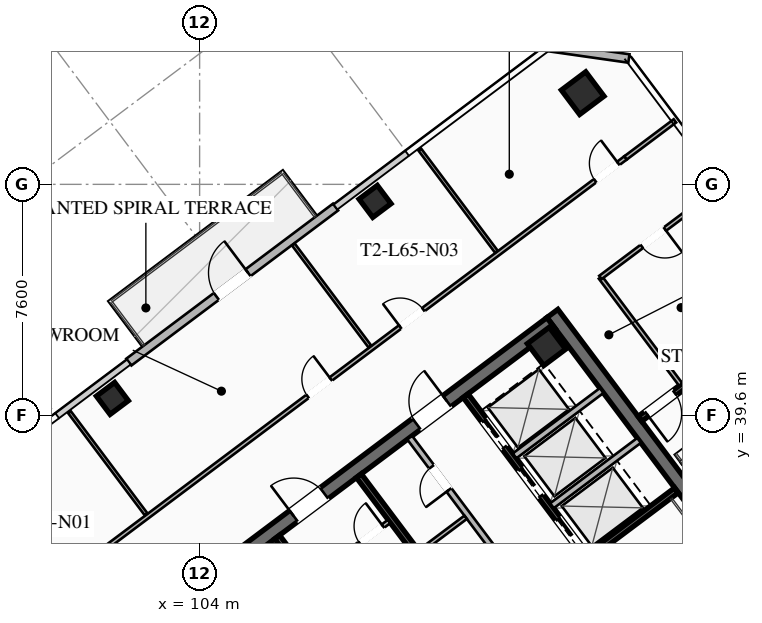
"""IFC4 building model, lengths in metres.
Left out: names, types, materials, properties, quantities, classifications, styles, units other than length and angle.
Written with IfcOpenShell. Run it as: python <this file> out.ifc"""

import sys

from ifc_helpers import new_model, si_unit, direction, frame, frame_2d, origin, origin_2d, place, context, subcontext, project, spatial, rectangle, hollow_rectangle, extrude, element, fill, save


model = new_model("IFC4")
c1 = context("Model", 3, precision=1e-05, world=origin(), true_north=direction((0.0, 1.0)))
c2 = subcontext(c1, "Body", "Model", "MODEL_VIEW")
j1 = project(units=[si_unit("LENGTHUNIT", "METRE"), si_unit("PLANEANGLEUNIT", "RADIAN")], contexts=[c1])
p1 = place(None, origin())
s1 = spatial("IfcSite", under=j1, at=p1, CompositionType="ELEMENT")
p2 = place(p1, origin())
s2 = spatial("IfcBuilding", under=s1, at=p2, CompositionType="ELEMENT")
p3 = place(p2, frame((0.0, 0.0, 239.7)))
s3 = spatial("IfcBuildingStorey", under=s2, at=p3, CompositionType="ELEMENT", Elevation=239.7)
p4 = place(p3, frame((115.604, 42.953, 0.0), z_axis=(0.0, 0.0, 1.0), x_axis=(0.600005007985, -0.799996243986, 0.0)))
e1 = element("IfcWall", 1, at=p4, inside=s3, PredefinedType="SHEAR", context=c2, shape_type="SweptSolid", body=[
    extrude(rectangle(XDim=15.6, YDim=0.45, at=frame_2d((7.8, 0.0))), origin(), (0.0, 0.0, 1.0), 3.55),
])
p5 = place(p3, frame((103.351, 33.482, 0.0), z_axis=(0.0, 0.0, 1.0), x_axis=(0.8, 0.6, 0.0)))
e2 = element("IfcWall", 2, at=p5, inside=s3, PredefinedType="SHEAR", context=c2, shape_type="SweptSolid", body=[
    extrude(rectangle(XDim=15.26, YDim=0.45, at=frame_2d((7.63, 0.0))), origin(), (0.0, 0.0, 1.0), 3.55),
])
p6 = place(p5, frame((4.68, 0.0, 0.0)))
e3 = element("IfcOpeningElement", 3, at=p6, cuts=e2, PredefinedType="OPENING", context=c2, shape_type="SweptSolid", body=[
    extrude(rectangle(XDim=1.25, YDim=2.25, at=frame_2d((0.625, 1.125))), frame((0.0, 0.235, 0.0), z_axis=(0.0, -1.0, 0.0), x_axis=(1.0, 0.0, 0.0)), (0.0, 0.0, 1.0), 0.47),
])
p7 = place(p5, frame((9.73, 0.0, 0.0)))
e4 = element("IfcOpeningElement", 4, at=p7, cuts=e2, PredefinedType="OPENING", context=c2, shape_type="SweptSolid", body=[
    extrude(rectangle(XDim=1.25, YDim=2.25, at=frame_2d((0.625, 1.125))), frame((0.0, 0.235, 0.0), z_axis=(0.0, -1.0, 0.0), x_axis=(1.0, 0.0, 0.0)), (0.0, 0.0, 1.0), 0.47),
])
p8 = place(p3, frame((115.41, 41.87, 0.0), z_axis=(0.0, 0.0, 1.0), x_axis=(0.799999996291, 0.600000004945, 0.0)))
e5 = element("IfcColumn", 5, at=p8, inside=s3, PredefinedType="COLUMN", context=c2, shape_type="SweptSolid", body=[
    extrude(hollow_rectangle(XDim=0.9, YDim=0.9, WallThickness=0.04, at=origin_2d()), origin(), (0.0, 0.0, 1.0), 3.37),
])
p9 = place(p3, frame((116.6, 50.2, 0.0), z_axis=(0.0, 0.0, 1.0), x_axis=(0.799999996291, 0.600000004945, 0.0)))
e6 = element("IfcColumn", 6, at=p9, inside=s3, PredefinedType="COLUMN", context=c2, shape_type="SweptSolid", body=[
    extrude(hollow_rectangle(XDim=1.0, YDim=1.0, WallThickness=0.04, at=origin_2d()), origin(), (0.0, 0.0, 1.0), 3.37),
])
for number, where, z_axis, x_axis in (
    (7, (109.77, 46.64, 0.0), (0.0, 0.0, 1.0), (0.8, 0.6, 0.0)),
    (8, (101.13, 40.16, 0.0), (0.0, 0.0, 1.0), (0.8, 0.6, 0.0)),
):
    element("IfcColumn", number, at=place(p3, frame(where, z_axis=z_axis, x_axis=x_axis)), inside=s3, PredefinedType="COLUMN", context=c2, shape_type="SweptSolid", body=[
        extrude(hollow_rectangle(XDim=0.75, YDim=0.75, WallThickness=0.032, at=origin_2d()), origin(), (0.0, 0.0, 1.0), 3.37),
    ])
p10 = place(p3, frame((101.672, 41.354, 0.0), z_axis=(0.0, 0.0, 1.0), x_axis=(0.799986212866, 0.600018382406, 0.0)))
e9 = element("IfcWall", 9, at=p10, inside=s3, PredefinedType="SOLIDWALL", context=c2, shape_type="SweptSolid", body=[
    extrude(rectangle(XDim=8.5, YDim=0.28, at=frame_2d((4.25, 0.0))), origin(), (0.0, 0.0, 1.0), 3.37),
])
p11 = place(p10, frame((3.6, 0.0, 0.0)))
e10 = element("IfcOpeningElement", 10, at=p11, cuts=e9, PredefinedType="OPENING", context=c2, shape_type="SweptSolid", body=[
    extrude(rectangle(XDim=1.3, YDim=2.15, at=frame_2d((0.65, 1.075))), frame((0.0, 0.15, 0.0), z_axis=(0.0, -1.0, 0.0), x_axis=(1.0, 0.0, 0.0)), (0.0, 0.0, 1.0), 0.3),
])
p12 = place(p3, frame((115.46, 51.72, 0.0), z_axis=(0.0, 0.0, 1.0), x_axis=(0.989956760759, -0.141370477216, 0.0)))
e11 = element("IfcWall", 11, at=p12, inside=s3, PredefinedType="SOLIDWALL", context=c2, shape_type="SweptSolid", body=[
    extrude(rectangle(XDim=2.687, YDim=0.28, at=frame_2d((1.344, 0.0))), origin(), (0.0, 0.0, 1.0), 3.37),
])
p13 = place(p3, frame((111.44, 29.08, 0.0), z_axis=(0.0, 0.0, 1.0), x_axis=(-0.59999041401, 0.800007189403, 0.0)))
e12 = element("IfcWall", 12, at=p13, inside=s3, PredefinedType="SHEAR", context=c2, shape_type="SweptSolid", body=[
    extrude(rectangle(XDim=8.15, YDim=0.2, at=frame_2d((4.075, 0.0))), origin(), (0.0, 0.0, 1.0), 3.37),
])
p14 = place(p13, frame((0.45, 0.0, 0.0)))
e13 = element("IfcOpeningElement", 13, at=p14, cuts=e12, PredefinedType="OPENING", context=c2, shape_type="SweptSolid", body=[
    extrude(rectangle(XDim=1.15, YDim=2.2, at=frame_2d((0.575, 1.1))), frame((0.0, 0.11, 0.0), z_axis=(0.0, -1.0, 0.0), x_axis=(1.0, 0.0, 0.0)), (0.0, 0.0, 1.0), 0.22),
])
p15 = place(p3, frame((116.54, 34.78, 0.0), z_axis=(0.0, 0.0, 1.0), x_axis=(0.800014909178, 0.599980120581, 0.0)))
e14 = element("IfcWall", 14, at=p15, inside=s3, PredefinedType="SHEAR", context=c2, shape_type="SweptSolid", body=[
    extrude(rectangle(XDim=3.93, YDim=0.2, at=frame_2d((1.965, 0.0))), origin(), (0.0, 0.0, 1.0), 3.37),
])
p16 = place(p3, frame((118.058, 25.856, 0.0), z_axis=(0.0, 0.0, 1.0), x_axis=(-0.600002657301, 0.799998007018, 0.0)))
e15 = element("IfcWall", 15, at=p16, inside=s3, PredefinedType="SHEAR", context=c2, shape_type="SweptSolid", body=[
    extrude(rectangle(XDim=14.7, YDim=0.2, at=frame_2d((7.35, 0.0))), origin(), (0.0, 0.0, 1.0), 3.37),
])
p17 = place(p3, frame((112.75, 40.25, 0.0), z_axis=(0.0, 0.0, 1.0), x_axis=(0.599994036198, -0.800004472816, 0.0)))
e16 = element("IfcWall", 16, at=p17, inside=s3, PredefinedType="SHEAR", context=c2, shape_type="SweptSolid", body=[
    extrude(rectangle(XDim=6.55, YDim=0.2, at=frame_2d((3.275, 0.0))), origin(), (0.0, 0.0, 1.0), 3.37),
])
p18 = place(p17, frame((5.075, 0.0, 0.0)))
e17 = element("IfcOpeningElement", 17, at=p18, cuts=e16, PredefinedType="OPENING", context=c2, shape_type="SweptSolid", body=[
    extrude(rectangle(XDim=1.1, YDim=2.2, at=frame_2d((0.55, 1.1))), frame((0.0, 0.11, 0.0), z_axis=(0.0, -1.0, 0.0), x_axis=(1.0, 0.0, 0.0)), (0.0, 0.0, 1.0), 0.22),
])
p19 = place(p17, frame((3.025, 0.0, 0.0)))
e18 = element("IfcOpeningElement", 18, at=p19, cuts=e16, PredefinedType="OPENING", context=c2, shape_type="SweptSolid", body=[
    extrude(rectangle(XDim=1.1, YDim=2.2, at=frame_2d((0.55, 1.1))), frame((0.0, 0.11, 0.0), z_axis=(0.0, -1.0, 0.0), x_axis=(1.0, 0.0, 0.0)), (0.0, 0.0, 1.0), 0.22),
])
p20 = place(p17, frame((1.025, 0.0, 0.0)))
e19 = element("IfcOpeningElement", 19, at=p20, cuts=e16, PredefinedType="OPENING", context=c2, shape_type="SweptSolid", body=[
    extrude(rectangle(XDim=1.1, YDim=2.2, at=frame_2d((0.55, 1.1))), frame((0.0, 0.11, 0.0), z_axis=(0.0, -1.0, 0.0), x_axis=(1.0, 0.0, 0.0)), (0.0, 0.0, 1.0), 0.22),
])
for number, where, z_axis, x_axis in (
    (20, (115.59, 36.63, 0.0), (0.0, 0.0, 1.0), (0.8, 0.6, 0.0)),
    (21, (114.36, 38.27, 0.0), (0.0, 0.0, 1.0), (0.8, 0.6, 0.0)),
):
    element("IfcWall", number, at=place(p3, frame(where, z_axis=z_axis, x_axis=x_axis)), inside=s3, PredefinedType="SOLIDWALL", context=c2, shape_type="SweptSolid", body=[
        extrude(rectangle(XDim=3.58, YDim=0.2, at=frame_2d((1.79, 0.0))), origin(), (0.0, 0.0, 1.0), 3.37),
    ])
p21 = place(p3, frame((107.71, 34.22, 0.0), z_axis=(0.0, 0.0, 1.0), x_axis=(0.799981399002, 0.60002480053, 0.0)))
e22 = element("IfcWall", 22, at=p21, inside=s3, PredefinedType="PARTITIONING", context=c2, shape_type="SweptSolid", body=[
    extrude(rectangle(XDim=3.15, YDim=0.135, at=frame_2d((1.575, 0.0))), origin(), (0.0, 0.0, 1.0), 2.723),
])
p22 = place(p21, frame((0.25, 0.0, 0.0)))
e23 = element("IfcOpeningElement", 23, at=p22, cuts=e22, PredefinedType="OPENING", context=c2, shape_type="SweptSolid", body=[
    extrude(rectangle(XDim=0.95, YDim=2.05, at=frame_2d((0.475, 1.025))), frame((0.0, 0.077, 0.0), z_axis=(0.0, -1.0, 0.0), x_axis=(1.0, 0.0, 0.0)), (0.0, 0.0, 1.0), 0.155),
])
p23 = place(p21, frame((1.95, 0.0, 0.0)))
e24 = element("IfcOpeningElement", 24, at=p23, cuts=e22, PredefinedType="OPENING", context=c2, shape_type="SweptSolid", body=[
    extrude(rectangle(XDim=0.95, YDim=2.05, at=frame_2d((0.475, 1.025))), frame((0.0, 0.077, 0.0), z_axis=(0.0, -1.0, 0.0), x_axis=(1.0, 0.0, 0.0)), (0.0, 0.0, 1.0), 0.155),
])
p24 = place(p3, frame((115.11, 33.27, 0.0), z_axis=(0.0, 0.0, 1.0), x_axis=(-0.600011160345, 0.79999162962, 0.0)))
e25 = element("IfcWall", 25, at=p24, inside=s3, PredefinedType="SOLIDWALL", context=c2, shape_type="SweptSolid", body=[
    extrude(rectangle(XDim=7.0, YDim=0.2, at=frame_2d((3.5, 0.0))), origin(), (0.0, 0.0, 1.0), 2.723),
])
p25 = place(p24, frame((0.85, 0.0, 0.0)))
e26 = element("IfcOpeningElement", 26, at=p25, cuts=e25, PredefinedType="OPENING", context=c2, shape_type="SweptSolid", body=[
    extrude(rectangle(XDim=0.95, YDim=2.05, at=frame_2d((0.475, 1.025))), frame((0.0, 0.11, 0.0), z_axis=(0.0, -1.0, 0.0), x_axis=(1.0, 0.0, 0.0)), (0.0, 0.0, 1.0), 0.22),
])
p26 = place(p24, frame((4.85, 0.0, 0.0)))
e27 = element("IfcOpeningElement", 27, at=p26, cuts=e25, PredefinedType="OPENING", context=c2, shape_type="SweptSolid", body=[
    extrude(rectangle(XDim=0.95, YDim=2.05, at=frame_2d((0.475, 1.025))), frame((0.0, 0.11, 0.0), z_axis=(0.0, -1.0, 0.0), x_axis=(1.0, 0.0, 0.0)), (0.0, 0.0, 1.0), 0.22),
])
p27 = place(p3, frame((111.246, 35.122, 0.0), z_axis=(0.0, 0.0, 1.0), x_axis=(0.8, 0.6, 0.0)))
e28 = element("IfcWall", 28, at=p27, inside=s3, PredefinedType="PARTITIONING", context=c2, shape_type="SweptSolid", body=[
    extrude(rectangle(XDim=1.88, YDim=0.135, at=frame_2d((0.94, 0.0))), origin(), (0.0, 0.0, 1.0), 2.723),
])
p28 = place(p3, frame((121.204, 41.528, 0.0), z_axis=(0.0, 0.0, 1.0), x_axis=(-0.800017232136, -0.599977023131, 0.0)))
e29 = element("IfcWall", 29, at=p28, inside=s3, PredefinedType="SHEAR", context=c2, shape_type="SweptSolid", body=[
    extrude(rectangle(XDim=3.4, YDim=0.2, at=frame_2d((1.7, 0.0))), origin(), (0.0, 0.0, 1.0), 3.37),
])
p29 = place(p28, frame((1.975, 0.0, 0.0)))
e30 = element("IfcOpeningElement", 30, at=p29, cuts=e29, PredefinedType="OPENING", context=c2, shape_type="SweptSolid", body=[
    extrude(rectangle(XDim=1.15, YDim=2.2, at=frame_2d((0.575, 1.1))), frame((0.0, 0.11, 0.0), z_axis=(0.0, -1.0, 0.0), x_axis=(1.0, 0.0, 0.0)), (0.0, 0.0, 1.0), 0.22),
])
p30 = place(p3, frame((119.824, 40.618, 0.0), z_axis=(0.0, 0.0, 1.0), x_axis=(-0.599982243973, 0.800013316712, 0.0)))
e31 = element("IfcWall", 31, at=p30, inside=s3, PredefinedType="PARTITIONING", context=c2, shape_type="SweptSolid", body=[
    extrude(rectangle(XDim=4.4, YDim=0.135, at=frame_2d((2.2, 0.0))), origin(), (0.0, 0.0, 1.0), 2.723),
])
p31 = place(p3, frame((98.93, 33.76, 0.0), z_axis=(0.0, 0.0, 1.0), x_axis=(0.8, 0.6, 0.0)))
e32 = element("IfcWall", 32, at=p31, inside=s3, PredefinedType="PARTITIONING", context=c2, shape_type="SweptSolid", body=[
    extrude(rectangle(XDim=23.85, YDim=0.135, at=frame_2d((11.925, 0.0))), origin(), (0.0, 0.0, 1.0), 2.723),
])
p32 = place(p31, frame((0.3, 0.0, 0.0)))
e33 = element("IfcOpeningElement", 33, at=p32, cuts=e32, PredefinedType="OPENING", context=c2, shape_type="SweptSolid", body=[
    extrude(rectangle(XDim=0.95, YDim=2.05, at=frame_2d((0.475, 1.025))), frame((0.0, 0.077, 0.0), z_axis=(0.0, -1.0, 0.0), x_axis=(1.0, 0.0, 0.0)), (0.0, 0.0, 1.0), 0.155),
])
p33 = place(p31, frame((10.779, 0.0, 0.0)))
e34 = element("IfcOpeningElement", 34, at=p33, cuts=e32, PredefinedType="OPENING", context=c2, shape_type="SweptSolid", body=[
    extrude(rectangle(XDim=0.95, YDim=2.05, at=frame_2d((0.475, 1.025))), frame((0.0, 0.077, 0.0), z_axis=(0.0, -1.0, 0.0), x_axis=(1.0, 0.0, 0.0)), (0.0, 0.0, 1.0), 0.155),
])
p34 = place(p31, frame((14.585, 0.0, 0.0)))
e35 = element("IfcOpeningElement", 35, at=p34, cuts=e32, PredefinedType="OPENING", context=c2, shape_type="SweptSolid", body=[
    extrude(rectangle(XDim=0.95, YDim=2.05, at=frame_2d((0.475, 1.025))), frame((0.0, 0.077, 0.0), z_axis=(0.0, -1.0, 0.0), x_axis=(1.0, 0.0, 0.0)), (0.0, 0.0, 1.0), 0.155),
])
p35 = place(p31, frame((22.6, 0.0, 0.0)))
e36 = element("IfcOpeningElement", 36, at=p35, cuts=e32, PredefinedType="OPENING", context=c2, shape_type="SweptSolid", body=[
    extrude(rectangle(XDim=0.95, YDim=2.05, at=frame_2d((0.475, 1.025))), frame((0.0, 0.077, 0.0), z_axis=(0.0, -1.0, 0.0), x_axis=(1.0, 0.0, 0.0)), (0.0, 0.0, 1.0), 0.155),
])
p36 = place(p3, frame((118.01, 48.07, 0.0), z_axis=(0.0, 0.0, 1.0), x_axis=(0.8, 0.6, 0.0)))
e37 = element("IfcWall", 37, at=p36, inside=s3, PredefinedType="PARTITIONING", context=c2, shape_type="SweptSolid", body=[
    extrude(rectangle(XDim=2.03, YDim=0.135, at=frame_2d((1.015, 0.0))), origin(), (0.0, 0.0, 1.0), 2.723),
])
for number, where, z_axis, x_axis in (
    (38, (102.242, 36.344, 0.0), (0.0, 0.0, 1.0), (-0.6, 0.8, 0.0)),
    (39, (109.602, 41.864, 0.0), (0.0, 0.0, 1.0), (-0.6, 0.8, 0.0)),
    (40, (113.762, 44.984, 0.0), (0.0, 0.0, 1.0), (-0.6, 0.8, 0.0)),
):
    element("IfcWall", number, at=place(p3, frame(where, z_axis=z_axis, x_axis=x_axis)), inside=s3, PredefinedType="PARTITIONING", context=c2, shape_type="SweptSolid", body=[
        extrude(rectangle(XDim=4.2, YDim=0.11, at=frame_2d((2.1, 0.0))), origin(), (0.0, 0.0, 1.0), 2.723),
    ])
p37 = place(p3, frame((121.224, 47.168, 0.0), z_axis=(0.0, 0.0, 1.0), x_axis=(-0.8, -0.6, 0.0)))
e41 = element("IfcWall", 41, at=p37, inside=s3, PredefinedType="PARTITIONING", context=c2, shape_type="SweptSolid", body=[
    extrude(rectangle(XDim=5.05, YDim=0.135, at=frame_2d((2.525, 0.0))), origin(), (0.0, 0.0, 1.0), 2.723),
])
p38 = place(p37, frame((2.4, 0.0, 0.0)))
e42 = element("IfcOpeningElement", 42, at=p38, cuts=e41, PredefinedType="OPENING", context=c2, shape_type="SweptSolid", body=[
    extrude(rectangle(XDim=0.95, YDim=2.05, at=frame_2d((0.475, 1.025))), frame((0.0, 0.077, 0.0), z_axis=(0.0, -1.0, 0.0), x_axis=(1.0, 0.0, 0.0)), (0.0, 0.0, 1.0), 0.155),
])
p39 = place(p11, origin())
e43 = element("IfcDoor", 43, at=p39, inside=s3, OperationType="SINGLE_SWING_RIGHT", PredefinedType="DOOR", context=c2, shape_type="SweptSolid", body=[
    extrude(rectangle(XDim=1.3, YDim=2.15, at=frame_2d((0.65, 1.075))), frame((0.0, 0.025, 0.0), z_axis=(0.0, -1.0, 0.0), x_axis=(1.0, 0.0, 0.0)), (0.0, 0.0, 1.0), 0.05),
])
fill(e10, e43)
p40 = place(p6, origin())
e44 = element("IfcDoor", 44, at=p40, inside=s3, OperationType="SINGLE_SWING_LEFT", PredefinedType="DOOR", context=c2, shape_type="SweptSolid", body=[
    extrude(rectangle(XDim=1.25, YDim=2.25, at=frame_2d((0.625, 1.125))), frame((0.0, 0.025, 0.0), z_axis=(0.0, -1.0, 0.0), x_axis=(1.0, 0.0, 0.0)), (0.0, 0.0, 1.0), 0.05),
])
fill(e3, e44)
p41 = place(p7, origin())
e45 = element("IfcDoor", 45, at=p41, inside=s3, OperationType="SINGLE_SWING_RIGHT", PredefinedType="DOOR", context=c2, shape_type="SweptSolid", body=[
    extrude(rectangle(XDim=1.25, YDim=2.25, at=frame_2d((0.625, 1.125))), frame((0.0, 0.025, 0.0), z_axis=(0.0, -1.0, 0.0), x_axis=(1.0, 0.0, 0.0)), (0.0, 0.0, 1.0), 0.05),
])
fill(e4, e45)
p42 = place(p23, origin())
e46 = element("IfcDoor", 46, at=p42, inside=s3, OperationType="SINGLE_SWING_RIGHT", PredefinedType="DOOR", context=c2, shape_type="SweptSolid", body=[
    extrude(rectangle(XDim=0.95, YDim=2.05, at=frame_2d((0.475, 1.025))), frame((0.0, 0.025, 0.0), z_axis=(0.0, -1.0, 0.0), x_axis=(1.0, 0.0, 0.0)), (0.0, 0.0, 1.0), 0.05),
])
fill(e24, e46)
p43 = place(p26, origin())
e47 = element("IfcDoor", 47, at=p43, inside=s3, OperationType="SINGLE_SWING_LEFT", PredefinedType="DOOR", context=c2, shape_type="SweptSolid", body=[
    extrude(rectangle(XDim=0.95, YDim=2.05, at=frame_2d((0.475, 1.025))), frame((0.0, 0.025, 0.0), z_axis=(0.0, -1.0, 0.0), x_axis=(1.0, 0.0, 0.0)), (0.0, 0.0, 1.0), 0.05),
])
fill(e27, e47)
p44 = place(p29, origin())
e48 = element("IfcDoor", 48, at=p44, inside=s3, OperationType="SINGLE_SWING_RIGHT", PredefinedType="DOOR", context=c2, shape_type="SweptSolid", body=[
    extrude(rectangle(XDim=1.15, YDim=2.2, at=frame_2d((0.575, 1.1))), frame((0.0, 0.025, 0.0), z_axis=(0.0, -1.0, 0.0), x_axis=(1.0, 0.0, 0.0)), (0.0, 0.0, 1.0), 0.05),
])
fill(e30, e48)
p45 = place(p33, origin())
e49 = element("IfcDoor", 49, at=p45, inside=s3, OperationType="SINGLE_SWING_RIGHT", PredefinedType="DOOR", context=c2, shape_type="SweptSolid", body=[
    extrude(rectangle(XDim=0.95, YDim=2.05, at=frame_2d((0.475, 1.025))), frame((0.0, 0.025, 0.0), z_axis=(0.0, -1.0, 0.0), x_axis=(1.0, 0.0, 0.0)), (0.0, 0.0, 1.0), 0.05),
])
fill(e34, e49)
p46 = place(p34, origin())
e50 = element("IfcDoor", 50, at=p46, inside=s3, OperationType="SINGLE_SWING_LEFT", PredefinedType="DOOR", context=c2, shape_type="SweptSolid", body=[
    extrude(rectangle(XDim=0.95, YDim=2.05, at=frame_2d((0.475, 1.025))), frame((0.0, 0.025, 0.0), z_axis=(0.0, -1.0, 0.0), x_axis=(1.0, 0.0, 0.0)), (0.0, 0.0, 1.0), 0.05),
])
fill(e35, e50)
p47 = place(p35, origin())
e51 = element("IfcDoor", 51, at=p47, inside=s3, OperationType="SINGLE_SWING_RIGHT", PredefinedType="DOOR", context=c2, shape_type="SweptSolid", body=[
    extrude(rectangle(XDim=0.95, YDim=2.05, at=frame_2d((0.475, 1.025))), frame((0.0, 0.025, 0.0), z_axis=(0.0, -1.0, 0.0), x_axis=(1.0, 0.0, 0.0)), (0.0, 0.0, 1.0), 0.05),
])
fill(e36, e51)
p48 = place(p38, origin())
e52 = element("IfcDoor", 52, at=p48, inside=s3, OperationType="SINGLE_SWING_LEFT", PredefinedType="DOOR", context=c2, shape_type="SweptSolid", body=[
    extrude(rectangle(XDim=0.95, YDim=2.05, at=frame_2d((0.475, 1.025))), frame((0.0, 0.025, 0.0), z_axis=(0.0, -1.0, 0.0), x_axis=(1.0, 0.0, 0.0)), (0.0, 0.0, 1.0), 0.05),
])
fill(e42, e52)
p49 = place(p18, origin())
e53 = element("IfcDoor", 53, at=p49, inside=s3, OperationType="SLIDING_TO_LEFT", PredefinedType="DOOR", context=c2, shape_type="SweptSolid", body=[
    extrude(rectangle(XDim=1.1, YDim=2.2, at=frame_2d((0.55, 1.1))), frame((0.0, 0.025, 0.0), z_axis=(0.0, -1.0, 0.0), x_axis=(1.0, 0.0, 0.0)), (0.0, 0.0, 1.0), 0.05),
])
fill(e17, e53)
p50 = place(p19, origin())
e54 = element("IfcDoor", 54, at=p50, inside=s3, OperationType="SLIDING_TO_LEFT", PredefinedType="DOOR", context=c2, shape_type="SweptSolid", body=[
    extrude(rectangle(XDim=1.1, YDim=2.2, at=frame_2d((0.55, 1.1))), frame((0.0, 0.025, 0.0), z_axis=(0.0, -1.0, 0.0), x_axis=(1.0, 0.0, 0.0)), (0.0, 0.0, 1.0), 0.05),
])
fill(e18, e54)
p51 = place(p20, origin())
e55 = element("IfcDoor", 55, at=p51, inside=s3, OperationType="SLIDING_TO_LEFT", PredefinedType="DOOR", context=c2, shape_type="SweptSolid", body=[
    extrude(rectangle(XDim=1.1, YDim=2.2, at=frame_2d((0.55, 1.1))), frame((0.0, 0.025, 0.0), z_axis=(0.0, -1.0, 0.0), x_axis=(1.0, 0.0, 0.0)), (0.0, 0.0, 1.0), 0.05),
])
fill(e19, e55)
save(model, sys.argv[1])
